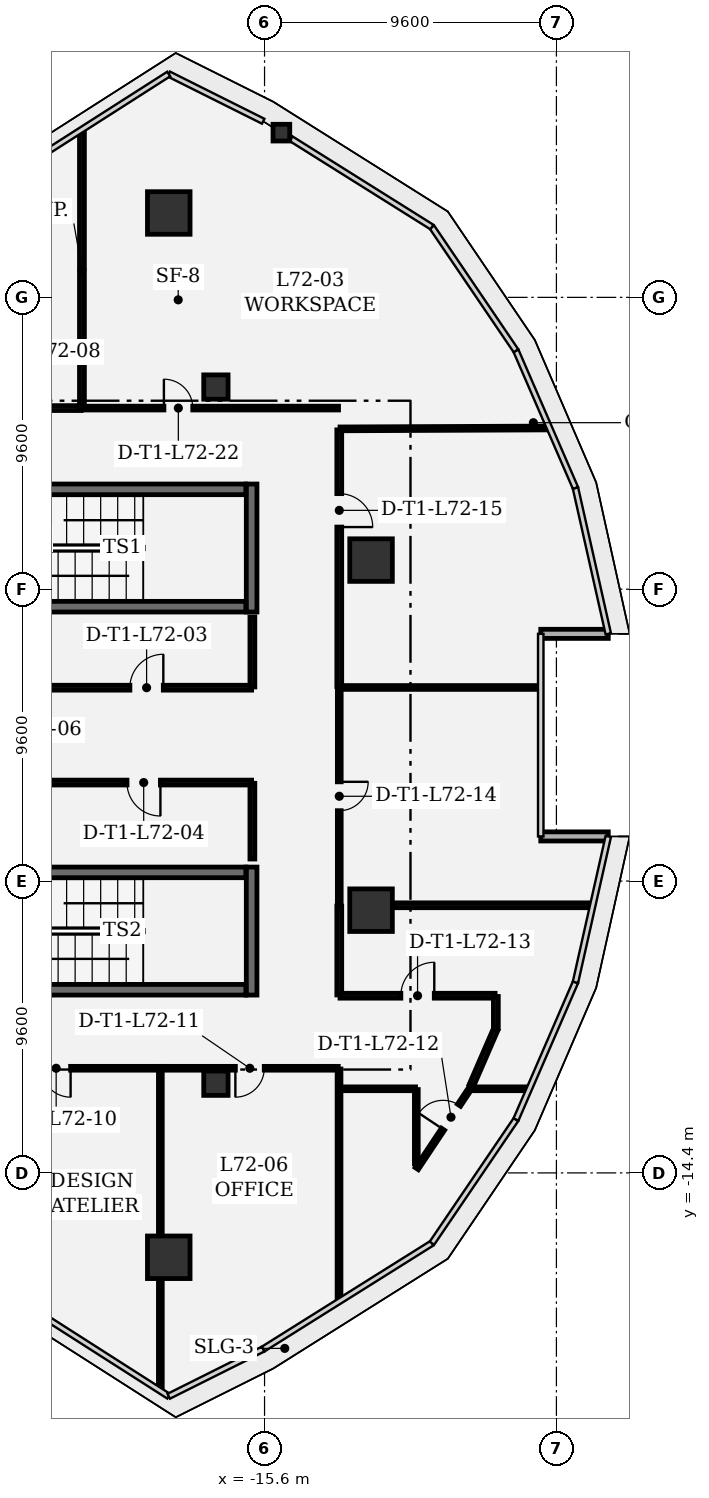
"""IFC4 building model, lengths in metres.
Left out: names, types, materials, properties, quantities, classifications, styles, units other than length and angle.
Written with IfcOpenShell. Run it as: python <this file> out.ifc"""

import sys

from ifc_helpers import new_model, si_unit, direction, frame, frame_2d, origin, origin_2d, place, context, subcontext, project, spatial, rectangle, extrude, element, fill, save


model = new_model("IFC4")
c1 = context("Model", 3, precision=1e-05, world=origin(), true_north=direction((0.0, 1.0)))
c2 = subcontext(c1, "Body", "Model", "MODEL_VIEW")
j1 = project(units=[si_unit("LENGTHUNIT", "METRE"), si_unit("PLANEANGLEUNIT", "RADIAN")], contexts=[c1])
p1 = place(None, origin())
s1 = spatial("IfcSite", under=j1, at=p1, CompositionType="ELEMENT")
p2 = place(p1, origin())
s2 = spatial("IfcBuilding", under=s1, at=p2, CompositionType="ELEMENT")
p3 = place(p2, frame((0.0, 0.0, 310.2)))
s3 = spatial("IfcBuildingStorey", under=s2, at=p3, CompositionType="ELEMENT", Elevation=310.2)
for number, where, z_axis, x_axis in (
    (1, (-18.75, -17.176, 0.0), (0.0, 0.0, 1.0), (1.0, 0.0, 0.0)),
    (2, (-12.097, -5.758, 0.0), (0.0, 0.0, 1.0), (1.0, 0.0, 0.0)),
    (3, (-12.097, 5.758, 0.0), (0.0, 0.0, 1.0), (1.0, 0.0, 0.0)),
    (4, (-18.75, 17.176, 0.0), (0.0, 0.0, 1.0), (1.0, 0.0, 0.0)),
):
    element("IfcColumn", number, at=place(p3, frame(where, z_axis=z_axis, x_axis=x_axis)), inside=s3, PredefinedType="COLUMN", context=c2, shape_type="SweptSolid", body=[
        extrude(rectangle(XDim=1.4, YDim=1.4, at=origin_2d()), origin(), (0.0, 0.0, 1.0), 4.2),
    ])
for number, where, z_axis, x_axis in (
    (5, (-17.2, 11.45, 0.0), (0.0, 0.0, 1.0), (1.0, 0.0, 0.0)),
    (6, (-17.2, -11.45, 0.0), (0.0, 0.0, 1.0), (1.0, 0.0, 0.0)),
):
    element("IfcColumn", number, at=place(p3, frame(where, z_axis=z_axis, x_axis=x_axis)), inside=s3, PredefinedType="COLUMN", context=c2, shape_type="SweptSolid", body=[
        extrude(rectangle(XDim=0.8, YDim=0.8, at=origin_2d()), origin(), (0.0, 0.0, 1.0), 4.2),
    ])
p4 = place(p3, frame((-15.046, 19.818, 0.0), z_axis=(0.0, 0.0, 1.0), x_axis=(1.0, 0.0, 0.0)))
e7 = element("IfcColumn", 7, at=p4, inside=s3, PredefinedType="COLUMN", context=c2, shape_type="SweptSolid", body=[
    extrude(rectangle(XDim=0.55, YDim=0.55, at=origin_2d()), origin(), (0.0, 0.0, 1.0), 4.2),
])
for number, where, z_axis, x_axis in (
    (8, (-4.294, -3.332, 0.0), (0.0, 0.0, 1.0), (-1.0, 0.0, 0.0)),
    (9, (-6.515, 3.332, 0.0), (0.0, 0.0, 1.0), (1.0, 0.0, 0.0)),
):
    element("IfcWall", number, at=place(p3, frame(where, z_axis=z_axis, x_axis=x_axis)), inside=s3, PredefinedType="SOLIDWALL", context=c2, shape_type="SweptSolid", body=[
        extrude(rectangle(XDim=2.221, YDim=0.3, at=frame_2d((1.111, 0.0))), origin(), (0.0, 0.0, 1.0), 3.91),
    ])
p5 = place(p3, frame((-16.025, 4.05, 0.0), z_axis=(0.0, 0.0, 1.0), x_axis=(0.0, 1.0, 0.0)))
e10 = element("IfcWall", 10, at=p5, inside=s3, PredefinedType="SHEAR", context=c2, shape_type="SweptSolid", body=[
    extrude(rectangle(XDim=4.21, YDim=0.35, at=frame_2d((2.105, 0.0))), origin(), (0.0, 0.0, 1.0), 3.91),
])
p6 = place(p3, frame((-24.335, 4.225, 0.0), z_axis=(0.0, 0.0, 1.0), x_axis=(1.0, 0.0, 0.0)))
e11 = element("IfcWall", 11, at=p6, inside=s3, PredefinedType="SHEAR", context=c2, shape_type="SweptSolid", body=[
    extrude(rectangle(XDim=8.12, YDim=0.35, at=frame_2d((4.06, 0.0))), origin(), (0.0, 0.0, 1.0), 3.91),
])
p7 = place(p3, frame((-16.215, 8.085, 0.0), z_axis=(0.0, 0.0, 1.0), x_axis=(-1.0, 0.0, 0.0)))
e12 = element("IfcWall", 12, at=p7, inside=s3, PredefinedType="SHEAR", context=c2, shape_type="SweptSolid", body=[
    extrude(rectangle(XDim=8.12, YDim=0.35, at=frame_2d((4.06, 0.0))), origin(), (0.0, 0.0, 1.0), 3.91),
])
p8 = place(p7, frame((6.74, 0.0, 0.0)))
e13 = element("IfcOpeningElement", 13, at=p8, cuts=e12, PredefinedType="OPENING", context=c2, shape_type="SweptSolid", body=[
    extrude(rectangle(XDim=1.1, YDim=2.2, at=frame_2d((0.55, 1.1))), frame((0.0, 0.185, 0.0), z_axis=(0.0, -1.0, 0.0), x_axis=(1.0, 0.0, 0.0)), (0.0, 0.0, 1.0), 0.37),
])
p9 = place(p3, frame((-16.025, -8.55, 0.0), z_axis=(0.0, 0.0, 1.0), x_axis=(0.0, 1.0, 0.0)))
e14 = element("IfcWall", 14, at=p9, inside=s3, PredefinedType="SHEAR", context=c2, shape_type="SweptSolid", body=[
    extrude(rectangle(XDim=4.21, YDim=0.35, at=frame_2d((2.105, 0.0))), origin(), (0.0, 0.0, 1.0), 3.91),
])
p10 = place(p3, frame((-24.335, -8.375, 0.0), z_axis=(0.0, 0.0, 1.0), x_axis=(1.0, 0.0, 0.0)))
e15 = element("IfcWall", 15, at=p10, inside=s3, PredefinedType="SHEAR", context=c2, shape_type="SweptSolid", body=[
    extrude(rectangle(XDim=8.12, YDim=0.35, at=frame_2d((4.06, 0.0))), origin(), (0.0, 0.0, 1.0), 3.91),
])
p11 = place(p10, frame((0.28, 0.0, 0.0)))
e16 = element("IfcOpeningElement", 16, at=p11, cuts=e15, PredefinedType="OPENING", context=c2, shape_type="SweptSolid", body=[
    extrude(rectangle(XDim=1.1, YDim=2.2, at=frame_2d((0.55, 1.1))), frame((0.0, 0.185, 0.0), z_axis=(0.0, -1.0, 0.0), x_axis=(1.0, 0.0, 0.0)), (0.0, 0.0, 1.0), 0.37),
])
p12 = place(p3, frame((-16.215, -4.515, 0.0), z_axis=(0.0, 0.0, 1.0), x_axis=(-1.0, 0.0, 0.0)))
e17 = element("IfcWall", 17, at=p12, inside=s3, PredefinedType="SHEAR", context=c2, shape_type="SweptSolid", body=[
    extrude(rectangle(XDim=8.12, YDim=0.35, at=frame_2d((4.06, 0.0))), origin(), (0.0, 0.0, 1.0), 3.91),
])
p13 = place(p3, frame((-22.934, 1.56, 0.0), z_axis=(0.0, 0.0, 1.0), x_axis=(1.0, 0.0, 0.0)))
e18 = element("IfcWall", 18, at=p13, inside=s3, PredefinedType="PARTITIONING", context=c2, shape_type="SweptSolid", body=[
    extrude(rectangle(XDim=6.909, YDim=0.16, at=frame_2d((3.455, 0.0))), origin(), (0.0, 0.0, 1.0), 3.91),
])
p14 = place(p13, frame((2.905, 0.0, 0.0)))
e19 = element("IfcOpeningElement", 19, at=p14, cuts=e18, PredefinedType="OPENING", context=c2, shape_type="SweptSolid", body=[
    extrude(rectangle(XDim=1.1, YDim=2.15, at=frame_2d((0.55, 1.075))), frame((0.0, 0.09, 0.0), z_axis=(0.0, -1.0, 0.0), x_axis=(1.0, 0.0, 0.0)), (0.0, 0.0, 1.0), 0.18),
])
p15 = place(p3, frame((-16.0, 1.585, 0.0), z_axis=(0.0, 0.0, 1.0), x_axis=(0.0, 1.0, 0.0)))
e20 = element("IfcWall", 20, at=p15, inside=s3, PredefinedType="PARTITIONING", context=c2, shape_type="SweptSolid", body=[
    extrude(rectangle(XDim=2.302, YDim=0.16, at=frame_2d((1.151, 0.0))), origin(), (0.0, 0.0, 1.0), 3.91),
])
p16 = place(p3, frame((-16.0, -4.075, 0.0), z_axis=(0.0, 0.0, 1.0), x_axis=(0.0, 1.0, 0.0)))
e21 = element("IfcWall", 21, at=p16, inside=s3, PredefinedType="PARTITIONING", context=c2, shape_type="SweptSolid", body=[
    extrude(rectangle(XDim=2.49, YDim=0.16, at=frame_2d((1.245, 0.0))), origin(), (0.0, 0.0, 1.0), 3.91),
])
p17 = place(p3, frame((-16.025, -1.56, 0.0), z_axis=(0.0, 0.0, 1.0), x_axis=(-1.0, 0.0, 0.0)))
e22 = element("IfcWall", 22, at=p17, inside=s3, PredefinedType="PARTITIONING", context=c2, shape_type="SweptSolid", body=[
    extrude(rectangle(XDim=7.1, YDim=0.16, at=frame_2d((3.55, 0.0))), origin(), (0.0, 0.0, 1.0), 3.91),
])
p18 = place(p17, frame((3.0, 0.0, 0.0)))
e23 = element("IfcOpeningElement", 23, at=p18, cuts=e22, PredefinedType="OPENING", context=c2, shape_type="SweptSolid", body=[
    extrude(rectangle(XDim=1.1, YDim=2.15, at=frame_2d((0.55, 1.075))), frame((0.0, 0.09, 0.0), z_axis=(0.0, -1.0, 0.0), x_axis=(1.0, 0.0, 0.0)), (0.0, 0.0, 1.0), 0.18),
])
p19 = place(p3, frame((-28.069, 10.758, 0.0), z_axis=(0.0, 0.0, 1.0), x_axis=(1.0, 0.0, 0.0)))
e24 = element("IfcWall", 24, at=p19, inside=s3, PredefinedType="PARTITIONING", context=c2, shape_type="SweptSolid", body=[
    extrude(rectangle(XDim=6.438, YDim=0.16, at=frame_2d((3.219, 0.0))), origin(), (0.0, 0.0, 1.0), 3.91),
])
p20 = place(p19, frame((2.669, 0.0, 0.0)))
e25 = element("IfcOpeningElement", 25, at=p20, cuts=e24, PredefinedType="OPENING", context=c2, shape_type="SweptSolid", body=[
    extrude(rectangle(XDim=1.1, YDim=2.15, at=frame_2d((0.55, 1.075))), frame((0.0, 0.09, 0.0), z_axis=(0.0, -1.0, 0.0), x_axis=(1.0, 0.0, 0.0)), (0.0, 0.0, 1.0), 0.18),
])
p21 = place(p3, frame((-21.606, 10.783, 0.0), z_axis=(0.0, 0.0, 1.0), x_axis=(0.0, 1.0, 0.0)))
e26 = element("IfcWall", 26, at=p21, inside=s3, PredefinedType="PARTITIONING", context=c2, shape_type="SweptSolid", body=[
    extrude(rectangle(XDim=9.059, YDim=0.16, at=frame_2d((4.529, 0.0))), origin(), (0.0, 0.0, 1.0), 3.91),
])
p22 = place(p3, frame((-21.573, 10.758, 0.0), z_axis=(0.0, 0.0, 1.0), x_axis=(1.0, 0.0, 0.0)))
e27 = element("IfcWall", 27, at=p22, inside=s3, PredefinedType="PARTITIONING", context=c2, shape_type="SweptSolid", body=[
    extrude(rectangle(XDim=8.406, YDim=0.125, at=frame_2d((4.203, 0.0))), origin(), (0.0, 0.0, 1.0), 3.529),
])
p23 = place(p22, frame((2.663, 0.0, 0.0)))
e28 = element("IfcOpeningElement", 28, at=p23, cuts=e27, PredefinedType="OPENING", context=c2, shape_type="SweptSolid", body=[
    extrude(rectangle(XDim=0.95, YDim=2.15, at=frame_2d((0.475, 1.075))), frame((0.0, 0.073, 0.0), z_axis=(0.0, -1.0, 0.0), x_axis=(1.0, 0.0, 0.0)), (0.0, 0.0, 1.0), 0.145),
])
p24 = place(p3, frame((-13.117, 10.074, 0.0), z_axis=(0.0, 0.0, 1.0), x_axis=(0.999991048549, 0.004231172681, 0.0)))
e29 = element("IfcWall", 29, at=p24, inside=s3, PredefinedType="PARTITIONING", context=c2, shape_type="SweptSolid", body=[
    extrude(rectangle(XDim=6.809, YDim=0.125, at=frame_2d((3.404, 0.0))), origin(), (0.0, 0.0, 1.0), 3.91),
])
p25 = place(p3, frame((-19.052, -10.958, 0.0), z_axis=(0.0, 0.0, 1.0), x_axis=(-1.0, 0.0, 0.0)))
e30 = element("IfcWall", 30, at=p25, inside=s3, PredefinedType="PARTITIONING", context=c2, shape_type="SweptSolid", body=[
    extrude(rectangle(XDim=7.78, YDim=0.125, at=frame_2d((3.89, 0.0))), origin(), (0.0, 0.0, 1.0), 3.91),
])
p26 = place(p25, frame((2.927, 0.0, 0.0)))
e31 = element("IfcOpeningElement", 31, at=p26, cuts=e30, PredefinedType="OPENING", context=c2, shape_type="SweptSolid", body=[
    extrude(rectangle(XDim=0.95, YDim=2.15, at=frame_2d((0.475, 1.075))), frame((0.0, 0.073, 0.0), z_axis=(0.0, -1.0, 0.0), x_axis=(1.0, 0.0, 0.0)), (0.0, 0.0, 1.0), 0.145),
])
p27 = place(p3, frame((-19.027, -21.49, 0.0), z_axis=(0.0, 0.0, 1.0), x_axis=(0.0, 1.0, 0.0)))
e32 = element("IfcWall", 32, at=p27, inside=s3, PredefinedType="PARTITIONING", context=c2, shape_type="SweptSolid", body=[
    extrude(rectangle(XDim=3.55, YDim=0.125, at=frame_2d((1.775, 0.0))), origin(), (0.0, 0.0, 1.0), 3.91),
])
p28 = place(p3, frame((-19.027, -16.411, 0.0), z_axis=(0.0, 0.0, 1.0), x_axis=(0.0, 1.0, 0.0)))
e33 = element("IfcWall", 33, at=p28, inside=s3, PredefinedType="PARTITIONING", context=c2, shape_type="SweptSolid", body=[
    extrude(rectangle(XDim=5.428, YDim=0.125, at=frame_2d((2.714, 0.0))), origin(), (0.0, 0.0, 1.0), 3.91),
])
p29 = place(p3, frame((-13.15, -18.549, 0.0), z_axis=(0.0, 0.0, 1.0), x_axis=(0.0, 1.0, 0.0)))
e34 = element("IfcWall", 34, at=p29, inside=s3, PredefinedType="PARTITIONING", context=c2, shape_type="SweptSolid", body=[
    extrude(rectangle(XDim=7.566, YDim=0.125, at=frame_2d((3.783, 0.0))), origin(), (0.0, 0.0, 1.0), 3.91),
])
p30 = place(p3, frame((-13.175, -10.958, 0.0), z_axis=(0.0, 0.0, 1.0), x_axis=(-1.0, 0.0, 0.0)))
e35 = element("IfcWall", 35, at=p30, inside=s3, PredefinedType="PARTITIONING", context=c2, shape_type="SweptSolid", body=[
    extrude(rectangle(XDim=5.819, YDim=0.125, at=frame_2d((2.91, 0.0))), origin(), (0.0, 0.0, 1.0), 3.529),
])
p31 = place(p30, frame((2.435, 0.0, 0.0)))
e36 = element("IfcOpeningElement", 36, at=p31, cuts=e35, PredefinedType="OPENING", context=c2, shape_type="SweptSolid", body=[
    extrude(rectangle(XDim=0.95, YDim=2.15, at=frame_2d((0.475, 1.075))), frame((0.0, 0.073, 0.0), z_axis=(0.0, -1.0, 0.0), x_axis=(1.0, 0.0, 0.0)), (0.0, 0.0, 1.0), 0.145),
])
p32 = place(p3, frame((-6.972, -11.633, 0.0), z_axis=(0.0, 0.0, 1.0), x_axis=(-1.0, 0.0, 0.0)))
e37 = element("IfcWall", 37, at=p32, inside=s3, PredefinedType="PARTITIONING", context=c2, shape_type="SweptSolid", body=[
    extrude(rectangle(XDim=1.848, YDim=0.125, at=frame_2d((0.924, 0.0))), origin(), (0.0, 0.0, 1.0), 3.91),
])
p33 = place(p3, frame((-10.594, -14.259, 0.0), z_axis=(0.0, 0.0, 1.0), x_axis=(0.554358141875, 0.832278229042, 0.0)))
e38 = element("IfcWall", 38, at=p33, inside=s3, PredefinedType="PARTITIONING", context=c2, shape_type="SweptSolid", body=[
    extrude(rectangle(XDim=3.13, YDim=0.125, at=frame_2d((1.565, 0.0))), origin(), (0.0, 0.0, 1.0), 3.91),
])
p34 = place(p33, frame((1.557, 0.0, 0.0)))
e39 = element("IfcOpeningElement", 39, at=p34, cuts=e38, PredefinedType="OPENING", context=c2, shape_type="SweptSolid", body=[
    extrude(rectangle(XDim=0.95, YDim=2.15, at=frame_2d((0.475, 1.075))), frame((0.0, 0.073, 0.0), z_axis=(0.0, -1.0, 0.0), x_axis=(1.0, 0.0, 0.0)), (0.0, 0.0, 1.0), 0.145),
])
p35 = place(p3, frame((-10.608, -14.101, 0.0), z_axis=(0.0, 0.0, 1.0), x_axis=(0.0, 1.0, 0.0)))
e40 = element("IfcWall", 40, at=p35, inside=s3, PredefinedType="PARTITIONING", context=c2, shape_type="SweptSolid", body=[
    extrude(rectangle(XDim=2.443, YDim=0.125, at=frame_2d((1.222, 0.0))), origin(), (0.0, 0.0, 1.0), 3.91),
])
p36 = place(p3, frame((-10.633, -11.633, 0.0), z_axis=(0.0, 0.0, 1.0), x_axis=(-1.0, 0.0, 0.0)))
e41 = element("IfcWall", 41, at=p36, inside=s3, PredefinedType="PARTITIONING", context=c2, shape_type="SweptSolid", body=[
    extrude(rectangle(XDim=2.407, YDim=0.125, at=frame_2d((1.204, 0.0))), origin(), (0.0, 0.0, 1.0), 3.91),
])
p37 = place(p3, frame((-4.884, -5.597, 0.0), z_axis=(0.0, 0.0, 1.0), x_axis=(-1.0, 0.0, 0.0)))
e42 = element("IfcWall", 42, at=p37, inside=s3, PredefinedType="PARTITIONING", context=c2, shape_type="SweptSolid", body=[
    extrude(rectangle(XDim=6.448, YDim=0.16, at=frame_2d((3.224, 0.0))), origin(), (0.0, 0.0, 1.0), 3.91),
])
p38 = place(p3, frame((-13.142, -5.622, 0.0), z_axis=(0.0, 0.0, 1.0), x_axis=(0.0, -1.0, 0.0)))
e43 = element("IfcWall", 43, at=p38, inside=s3, PredefinedType="PARTITIONING", context=c2, shape_type="SweptSolid", body=[
    extrude(rectangle(XDim=2.925, YDim=0.16, at=frame_2d((1.463, 0.0))), origin(), (0.0, 0.0, 1.0), 3.13),
])
p39 = place(p3, frame((-13.117, -8.572, 0.0), z_axis=(0.0, 0.0, 1.0), x_axis=(1.0, 0.0, 0.0)))
e44 = element("IfcWall", 44, at=p39, inside=s3, PredefinedType="PARTITIONING", context=c2, shape_type="SweptSolid", body=[
    extrude(rectangle(XDim=5.1, YDim=0.16, at=frame_2d((2.55, 0.0))), origin(), (0.0, 0.0, 1.0), 3.91),
])
p40 = place(p39, frame((2.0, 0.0, 0.0)))
e45 = element("IfcOpeningElement", 45, at=p40, cuts=e44, PredefinedType="OPENING", context=c2, shape_type="SweptSolid", body=[
    extrude(rectangle(XDim=1.1, YDim=2.15, at=frame_2d((0.55, 1.075))), frame((0.0, 0.09, 0.0), z_axis=(0.0, -1.0, 0.0), x_axis=(1.0, 0.0, 0.0)), (0.0, 0.0, 1.0), 0.18),
])
p41 = place(p3, frame((-7.992, -9.641, 0.0), z_axis=(0.0, 0.0, 1.0), x_axis=(0.0, 1.0, 0.0)))
e46 = element("IfcWall", 46, at=p41, inside=s3, PredefinedType="PARTITIONING", context=c2, shape_type="SweptSolid", body=[
    extrude(rectangle(XDim=1.044, YDim=0.16, at=frame_2d((0.522, 0.0))), origin(), (0.0, 0.0, 1.0), 3.91),
])
p42 = place(p3, frame((-8.798, -11.525, 0.0), z_axis=(0.0, 0.0, 1.0), x_axis=(0.397860715008, 0.917445830255, 0.0)))
e47 = element("IfcWall", 47, at=p42, inside=s3, PredefinedType="PARTITIONING", context=c2, shape_type="SweptSolid", body=[
    extrude(rectangle(XDim=2.002, YDim=0.16, at=frame_2d((1.001, 0.0))), origin(), (0.0, 0.0, 1.0), 3.91),
])
p43 = place(p3, frame((-6.595, 1.568, 0.0), z_axis=(0.0, 0.0, 1.0), x_axis=(-1.0, 0.0, 0.0)))
e48 = element("IfcWall", 48, at=p43, inside=s3, PredefinedType="PARTITIONING", context=c2, shape_type="SweptSolid", body=[
    extrude(rectangle(XDim=6.522, YDim=0.125, at=frame_2d((3.261, 0.0))), origin(), (0.0, 0.0, 1.0), 3.91),
])
p44 = place(p3, frame((-13.142, 1.542, 0.0), z_axis=(0.0, 0.0, 1.0), x_axis=(0.0, -1.0, 0.0)))
e49 = element("IfcWall", 49, at=p44, inside=s3, PredefinedType="PARTITIONING", context=c2, shape_type="SweptSolid", body=[
    extrude(rectangle(XDim=7.106, YDim=0.125, at=frame_2d((3.553, 0.0))), origin(), (0.0, 0.0, 1.0), 3.91),
])
p45 = place(p44, frame((3.078, 0.0, 0.0)))
e50 = element("IfcOpeningElement", 50, at=p45, cuts=e49, PredefinedType="OPENING", context=c2, shape_type="SweptSolid", body=[
    extrude(rectangle(XDim=0.95, YDim=2.15, at=frame_2d((0.475, 1.075))), frame((0.0, 0.073, 0.0), z_axis=(0.0, -1.0, 0.0), x_axis=(1.0, 0.0, 0.0)), (0.0, 0.0, 1.0), 0.145),
])
p46 = place(p3, frame((-13.142, 10.041, 0.0), z_axis=(0.0, 0.0, 1.0), x_axis=(0.0, -1.0, 0.0)))
e51 = element("IfcWall", 51, at=p46, inside=s3, PredefinedType="PARTITIONING", context=c2, shape_type="SweptSolid", body=[
    extrude(rectangle(XDim=8.441, YDim=0.16, at=frame_2d((4.22, 0.0))), origin(), (0.0, 0.0, 1.0), 3.13),
])
p47 = place(p46, frame((2.097, 0.0, 0.0)))
e52 = element("IfcOpeningElement", 52, at=p47, cuts=e51, PredefinedType="OPENING", context=c2, shape_type="SweptSolid", body=[
    extrude(rectangle(XDim=1.1, YDim=2.15, at=frame_2d((0.55, 1.075))), frame((0.0, 0.09, 0.0), z_axis=(0.0, -1.0, 0.0), x_axis=(1.0, 0.0, 0.0)), (0.0, 0.0, 1.0), 0.18),
])
p48 = place(p14, origin())
e53 = element("IfcDoor", 53, at=p48, inside=s3, OperationType="SINGLE_SWING_RIGHT", PredefinedType="DOOR", context=c2, shape_type="SweptSolid", body=[
    extrude(rectangle(XDim=1.1, YDim=2.15, at=frame_2d((0.55, 1.075))), frame((0.0, 0.025, 0.0), z_axis=(0.0, -1.0, 0.0), x_axis=(1.0, 0.0, 0.0)), (0.0, 0.0, 1.0), 0.05),
])
fill(e19, e53)
p49 = place(p18, origin())
e54 = element("IfcDoor", 54, at=p49, inside=s3, OperationType="SINGLE_SWING_LEFT", PredefinedType="DOOR", context=c2, shape_type="SweptSolid", body=[
    extrude(rectangle(XDim=1.1, YDim=2.15, at=frame_2d((0.55, 1.075))), frame((0.0, 0.025, 0.0), z_axis=(0.0, -1.0, 0.0), x_axis=(1.0, 0.0, 0.0)), (0.0, 0.0, 1.0), 0.05),
])
fill(e23, e54)
p50 = place(p26, origin())
e55 = element("IfcDoor", 55, at=p50, inside=s3, OperationType="SINGLE_SWING_LEFT", PredefinedType="DOOR", context=c2, shape_type="SweptSolid", body=[
    extrude(rectangle(XDim=0.95, YDim=2.15, at=frame_2d((0.475, 1.075))), frame((0.0, 0.025, 0.0), z_axis=(0.0, -1.0, 0.0), x_axis=(1.0, 0.0, 0.0)), (0.0, 0.0, 1.0), 0.05),
])
fill(e31, e55)
p51 = place(p31, origin())
e56 = element("IfcDoor", 56, at=p51, inside=s3, OperationType="SINGLE_SWING_RIGHT", PredefinedType="DOOR", context=c2, shape_type="SweptSolid", body=[
    extrude(rectangle(XDim=0.95, YDim=2.15, at=frame_2d((0.475, 1.075))), frame((0.0, 0.025, 0.0), z_axis=(0.0, -1.0, 0.0), x_axis=(1.0, 0.0, 0.0)), (0.0, 0.0, 1.0), 0.05),
])
fill(e36, e56)
p52 = place(p34, origin())
e57 = element("IfcDoor", 57, at=p52, inside=s3, OperationType="SINGLE_SWING_LEFT", PredefinedType="DOOR", context=c2, shape_type="SweptSolid", body=[
    extrude(rectangle(XDim=0.95, YDim=2.15, at=frame_2d((0.475, 1.075))), frame((0.0, 0.025, 0.0), z_axis=(0.0, -1.0, 0.0), x_axis=(1.0, 0.0, 0.0)), (0.0, 0.0, 1.0), 0.05),
])
fill(e39, e57)
p53 = place(p40, origin())
e58 = element("IfcDoor", 58, at=p53, inside=s3, OperationType="SINGLE_SWING_RIGHT", PredefinedType="DOOR", context=c2, shape_type="SweptSolid", body=[
    extrude(rectangle(XDim=1.1, YDim=2.15, at=frame_2d((0.55, 1.075))), frame((0.0, 0.025, 0.0), z_axis=(0.0, -1.0, 0.0), x_axis=(1.0, 0.0, 0.0)), (0.0, 0.0, 1.0), 0.05),
])
fill(e45, e58)
p54 = place(p45, origin())
e59 = element("IfcDoor", 59, at=p54, inside=s3, OperationType="SINGLE_SWING_LEFT", PredefinedType="DOOR", context=c2, shape_type="SweptSolid", body=[
    extrude(rectangle(XDim=0.95, YDim=2.15, at=frame_2d((0.475, 1.075))), frame((0.0, 0.025, 0.0), z_axis=(0.0, -1.0, 0.0), x_axis=(1.0, 0.0, 0.0)), (0.0, 0.0, 1.0), 0.05),
])
fill(e50, e59)
p55 = place(p47, origin())
e60 = element("IfcDoor", 60, at=p55, inside=s3, OperationType="SINGLE_SWING_RIGHT", PredefinedType="DOOR", context=c2, shape_type="SweptSolid", body=[
    extrude(rectangle(XDim=1.1, YDim=2.15, at=frame_2d((0.55, 1.075))), frame((0.0, 0.025, 0.0), z_axis=(0.0, -1.0, 0.0), x_axis=(1.0, 0.0, 0.0)), (0.0, 0.0, 1.0), 0.05),
])
fill(e52, e60)
p56 = place(p23, origin())
e61 = element("IfcDoor", 61, at=p56, inside=s3, OperationType="SINGLE_SWING_LEFT", PredefinedType="DOOR", context=c2, shape_type="SweptSolid", body=[
    extrude(rectangle(XDim=0.95, YDim=2.15, at=frame_2d((0.475, 1.075))), frame((0.0, 0.025, 0.0), z_axis=(0.0, -1.0, 0.0), x_axis=(1.0, 0.0, 0.0)), (0.0, 0.0, 1.0), 0.05),
])
fill(e28, e61)
save(model, sys.argv[1])
